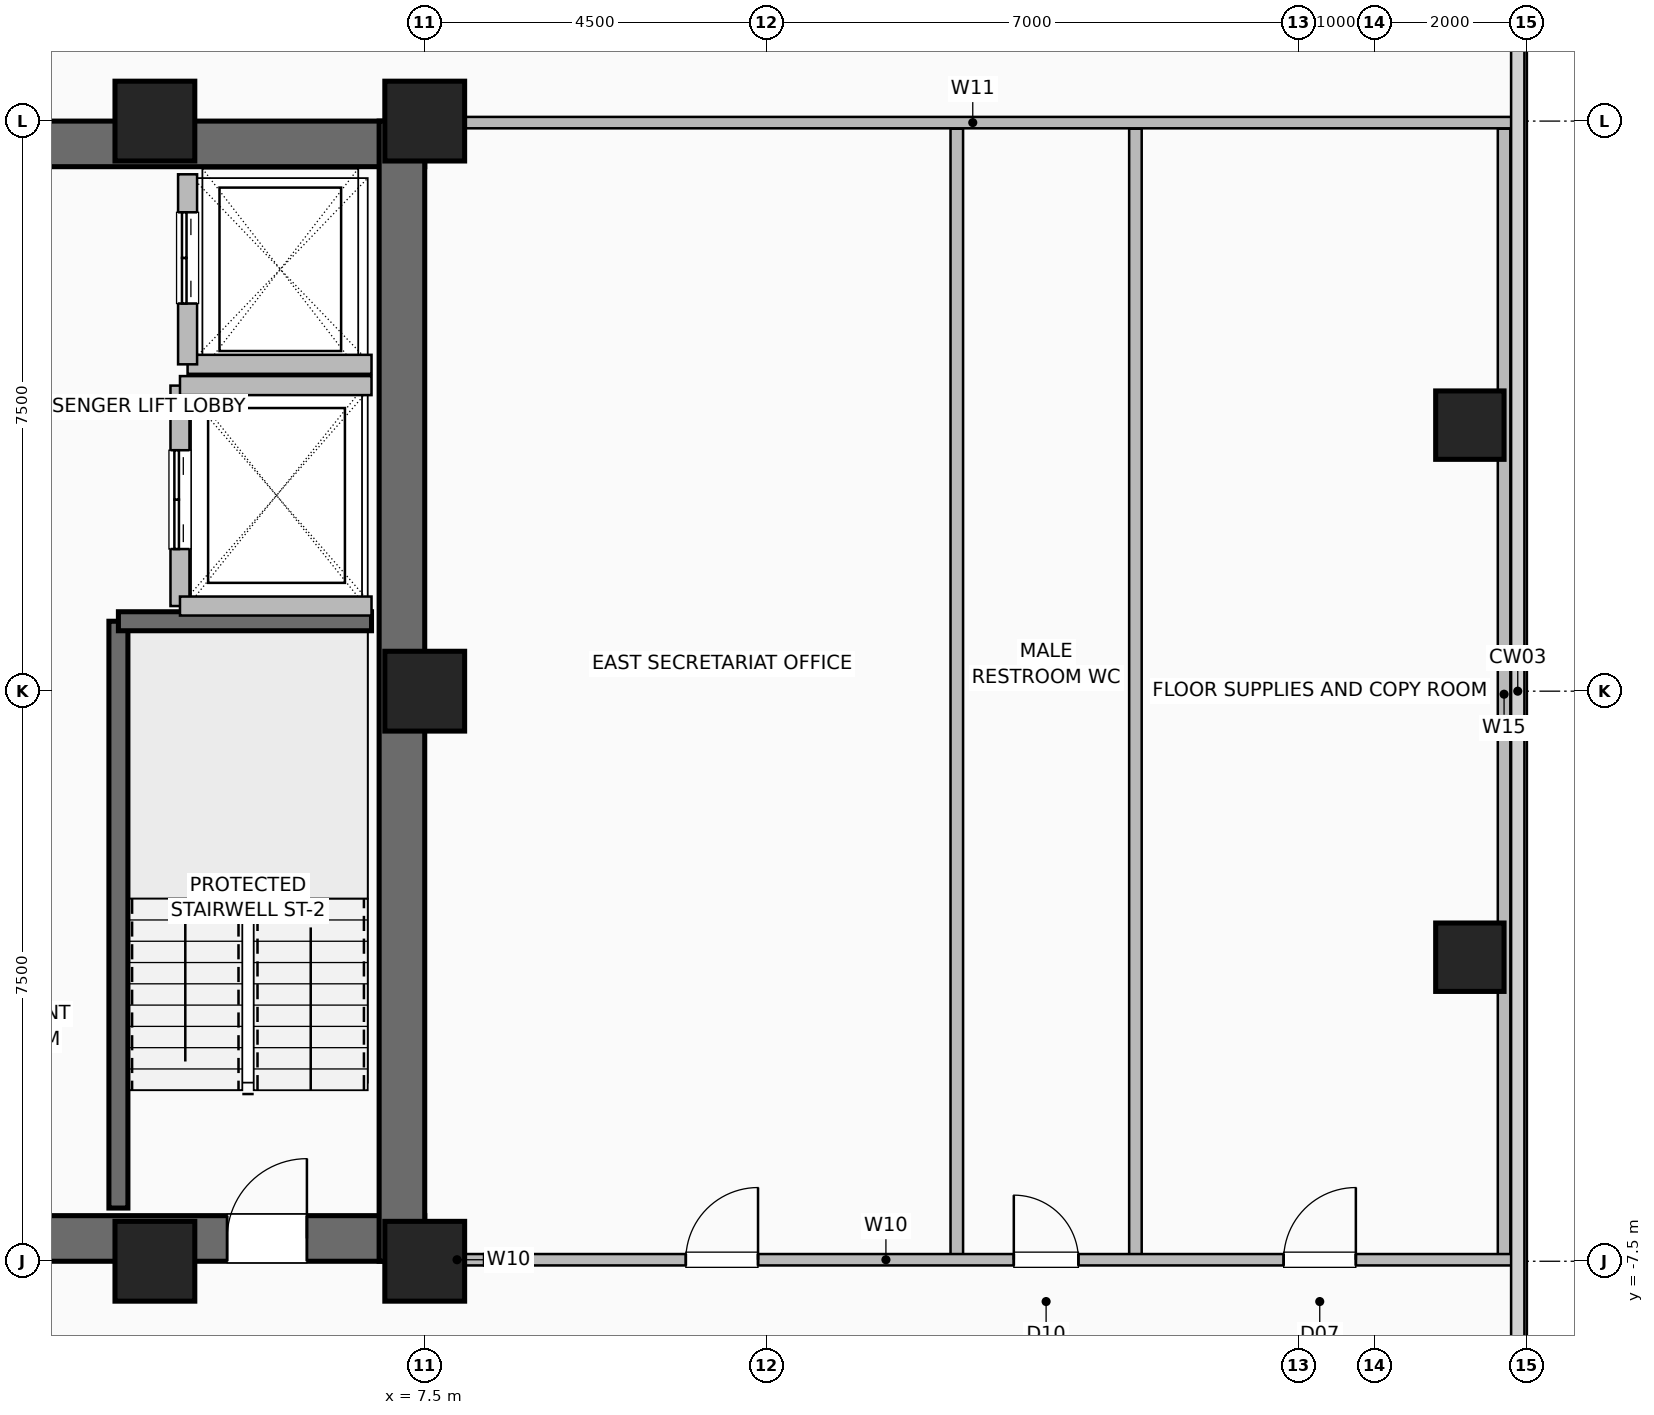
"""IFC4 building model, lengths in metres.
Left out: names, types, materials, properties, quantities, classifications, styles, units other than length and angle.
Written with IfcOpenShell. Run it as: python <this file> out.ifc"""

import sys

from ifc_helpers import new_model, si_unit, direction, frame, frame_2d, origin, origin_2d, place, context, subcontext, project, spatial, rectangle, hollow_rectangle, extrude, element, fill, save


model = new_model("IFC4")
c1 = context("Model", 3, precision=1e-05, world=origin(), true_north=direction((0.0, 1.0)))
c2 = subcontext(c1, "Body", "Model", "MODEL_VIEW")
j1 = project(units=[si_unit("LENGTHUNIT", "METRE"), si_unit("PLANEANGLEUNIT", "RADIAN")], contexts=[c1])
p1 = place(None, origin())
s1 = spatial("IfcSite", under=j1, at=p1, CompositionType="ELEMENT")
p2 = place(p1, origin())
s2 = spatial("IfcBuilding", under=s1, at=p2, CompositionType="ELEMENT")
p3 = place(p2, frame((0.0, 0.0, 112.0)))
s3 = spatial("IfcBuildingStorey", under=s2, at=p3, CompositionType="ELEMENT", Elevation=112.0)
for number, where, z_axis, x_axis in (
    (1, (3.95, -7.5, 0.0), (0.0, 0.0, 1.0), (1.0, 0.0, 0.0)),
    (2, (7.5, -7.5, 0.0), (0.0, 0.0, 1.0), (1.0, 0.0, 0.0)),
    (3, (7.5, 0.0, 0.0), (0.0, 0.0, 1.0), (1.0, 0.0, 0.0)),
    (4, (7.5, 7.5, 0.0), (0.0, 0.0, 1.0), (1.0, 0.0, 0.0)),
    (5, (3.95, 7.5, 0.0), (0.0, 0.0, 1.0), (1.0, 0.0, 0.0)),
):
    element("IfcColumn", number, at=place(p3, frame(where, z_axis=z_axis, x_axis=x_axis)), inside=s3, PredefinedType="COLUMN", context=c2, shape_type="SweptSolid", body=[
        extrude(hollow_rectangle(XDim=1.05, YDim=1.05, WallThickness=0.05, at=origin_2d()), origin(), (0.0, 0.0, 1.0), 3.6),
    ])
for number, where, z_axis, x_axis in (
    (6, (21.25, -3.5, 0.0), (0.0, 0.0, 1.0), (1.0, 0.0, 0.0)),
    (7, (21.25, 3.5, 0.0), (0.0, 0.0, 1.0), (1.0, 0.0, 0.0)),
):
    element("IfcColumn", number, at=place(p3, frame(where, z_axis=z_axis, x_axis=x_axis)), inside=s3, PredefinedType="COLUMN", context=c2, shape_type="SweptSolid", body=[
        extrude(hollow_rectangle(XDim=0.9, YDim=0.9, WallThickness=0.045, at=origin_2d()), origin(), (0.0, 0.0, 1.0), 3.6),
    ])
p4 = place(p3, frame((-7.5, -7.2, 0.0), z_axis=(0.0, 0.0, 1.0), x_axis=(1.0, 0.0, 0.0)))
e8 = element("IfcWall", 8, at=p4, inside=s3, PredefinedType="SHEAR", context=c2, shape_type="SweptSolid", body=[
    extrude(rectangle(XDim=15.0, YDim=0.6, at=frame_2d((7.5, 0.0))), origin(), (0.0, 0.0, 1.0), 3.36),
])
p5 = place(p4, frame((1.55, 0.0, 0.0)))
e9 = element("IfcOpeningElement", 9, at=p5, cuts=e8, PredefinedType="OPENING", context=c2, shape_type="SweptSolid", body=[
    extrude(rectangle(XDim=1.05, YDim=2.08, at=frame_2d((0.525, 1.04))), frame((0.0, 0.31, 0.0), z_axis=(0.0, -1.0, 0.0), x_axis=(1.0, 0.0, 0.0)), (0.0, 0.0, 1.0), 0.62),
])
p6 = place(p4, frame((12.4, 0.0, 0.0)))
e10 = element("IfcOpeningElement", 10, at=p6, cuts=e8, PredefinedType="OPENING", context=c2, shape_type="SweptSolid", body=[
    extrude(rectangle(XDim=1.05, YDim=2.08, at=frame_2d((0.525, 1.04))), frame((0.0, 0.31, 0.0), z_axis=(0.0, -1.0, 0.0), x_axis=(1.0, 0.0, 0.0)), (0.0, 0.0, 1.0), 0.62),
])
p7 = place(p4, frame((5.2, 0.0, 0.0)))
e11 = element("IfcOpeningElement", 11, at=p7, cuts=e8, PredefinedType="OPENING", context=c2, shape_type="SweptSolid", body=[
    extrude(rectangle(XDim=1.0, YDim=2.08, at=frame_2d((0.5, 1.04))), frame((0.0, 0.31, 0.0), z_axis=(0.0, -1.0, 0.0), x_axis=(1.0, 0.0, 0.0)), (0.0, 0.0, 1.0), 0.62),
])
p8 = place(p4, frame((8.65, 0.0, 0.0)))
e12 = element("IfcOpeningElement", 12, at=p8, cuts=e8, PredefinedType="OPENING", context=c2, shape_type="SweptSolid", body=[
    extrude(rectangle(XDim=1.0, YDim=2.08, at=frame_2d((0.5, 1.04))), frame((0.0, 0.31, 0.0), z_axis=(0.0, -1.0, 0.0), x_axis=(1.0, 0.0, 0.0)), (0.0, 0.0, 1.0), 0.62),
])
for number, where, z_axis, x_axis in (
    (13, (-7.5, 7.2, 0.0), (0.0, 0.0, 1.0), (1.0, 0.0, 0.0)),
    (14, (7.2, -7.5, 0.0), (0.0, 0.0, 1.0), (0.0, 1.0, 0.0)),
):
    element("IfcWall", number, at=place(p3, frame(where, z_axis=z_axis, x_axis=x_axis)), inside=s3, PredefinedType="SHEAR", context=c2, shape_type="SweptSolid", body=[
        extrude(rectangle(XDim=15.0, YDim=0.6, at=frame_2d((7.5, 0.0))), origin(), (0.0, 0.0, 1.0), 3.36),
    ])
p9 = place(p3, frame((3.47, -6.8, 0.0), z_axis=(0.0, 0.0, 1.0), x_axis=(0.0, 1.0, 0.0)))
e15 = element("IfcWall", 15, at=p9, inside=s3, PredefinedType="SHEAR", context=c2, shape_type="SweptSolid", body=[
    extrude(rectangle(XDim=7.72, YDim=0.25, at=frame_2d((3.86, 0.0))), origin(), (0.0, 0.0, 1.0), 3.36),
])
p10 = place(p3, frame((3.47, 0.92, 0.0), z_axis=(0.0, 0.0, 1.0), x_axis=(1.0, 0.0, 0.0)))
e16 = element("IfcWall", 16, at=p10, inside=s3, PredefinedType="SHEAR", context=c2, shape_type="SweptSolid", body=[
    extrude(rectangle(XDim=3.33, YDim=0.25, at=frame_2d((1.665, 0.0))), origin(), (0.0, 0.0, 1.0), 3.36),
])
p11 = place(p3, frame((4.38, 4.3, 0.0), z_axis=(0.0, 0.0, 1.0), x_axis=(1.0, 0.0, 0.0)))
e17 = element("IfcWall", 17, at=p11, inside=s3, PredefinedType="SHEAR", context=c2, shape_type="SweptSolid", body=[
    extrude(rectangle(XDim=2.42, YDim=0.25, at=frame_2d((1.21, 0.0))), origin(), (0.0, 0.0, 1.0), 3.36),
])
p12 = place(p3, frame((4.38, 4.3, 0.0), z_axis=(0.0, 0.0, 1.0), x_axis=(0.0, 1.0, 0.0)))
e18 = element("IfcWall", 18, at=p12, inside=s3, PredefinedType="SHEAR", context=c2, shape_type="SweptSolid", body=[
    extrude(rectangle(XDim=2.5, YDim=0.25, at=frame_2d((1.25, 0.0))), origin(), (0.0, 0.0, 1.0), 3.36),
])
p13 = place(p12, frame((0.8, 0.0, 0.0)))
e19 = element("IfcOpeningElement", 19, at=p13, cuts=e18, PredefinedType="OPENING", context=c2, shape_type="SweptSolid", body=[
    extrude(rectangle(XDim=1.2, YDim=2.2, at=frame_2d((0.6, 1.1))), frame((0.0, 0.135, 0.0), z_axis=(0.0, -1.0, 0.0), x_axis=(1.0, 0.0, 0.0)), (0.0, 0.0, 1.0), 0.27),
])
p14 = place(p3, frame((4.28, 1.12, 0.0), z_axis=(0.0, 0.0, 1.0), x_axis=(0.0, 1.0, 0.0)))
e20 = element("IfcWall", 20, at=p14, inside=s3, PredefinedType="SHEAR", context=c2, shape_type="SweptSolid", body=[
    extrude(rectangle(XDim=2.9, YDim=0.25, at=frame_2d((1.45, 0.0))), origin(), (0.0, 0.0, 1.0), 3.36),
])
p15 = place(p14, frame((0.75, 0.0, 0.0)))
e21 = element("IfcOpeningElement", 21, at=p15, cuts=e20, PredefinedType="OPENING", context=c2, shape_type="SweptSolid", body=[
    extrude(rectangle(XDim=1.3, YDim=2.3, at=frame_2d((0.65, 1.15))), frame((0.0, 0.135, 0.0), z_axis=(0.0, -1.0, 0.0), x_axis=(1.0, 0.0, 0.0)), (0.0, 0.0, 1.0), 0.27),
])
for number, where, z_axis, x_axis in (
    (22, (4.28, 1.12, 0.0), (0.0, 0.0, 1.0), (1.0, 0.0, 0.0)),
    (23, (4.28, 4.02, 0.0), (0.0, 0.0, 1.0), (1.0, 0.0, 0.0)),
):
    element("IfcWall", number, at=place(p3, frame(where, z_axis=z_axis, x_axis=x_axis)), inside=s3, PredefinedType="SHEAR", context=c2, shape_type="SweptSolid", body=[
        extrude(rectangle(XDim=2.52, YDim=0.25, at=frame_2d((1.26, 0.0))), origin(), (0.0, 0.0, 1.0), 3.36),
    ])
p16 = place(p3, frame((7.45, -7.48, 0.0), z_axis=(0.0, 0.0, 1.0), x_axis=(1.0, 0.0, 0.0)))
e24 = element("IfcWall", 24, at=p16, inside=s3, PredefinedType="PARTITIONING", context=c2, shape_type="SweptSolid", body=[
    extrude(rectangle(XDim=0.95, YDim=0.15, at=frame_2d((0.475, 0.0))), origin(), (0.0, 0.0, 1.0), 3.36),
])
for number, where, z_axis, x_axis in (
    (25, (16.85, -7.48, 0.0), (0.0, 0.0, 1.0), (0.0, 1.0, 0.0)),
    (26, (14.5, -7.48, 0.0), (0.0, 0.0, 1.0), (0.0, 1.0, 0.0)),
    (27, (21.7, -7.48, 0.0), (0.0, 0.0, 1.0), (0.0, 1.0, 0.0)),
):
    element("IfcWall", number, at=place(p3, frame(where, z_axis=z_axis, x_axis=x_axis)), inside=s3, PredefinedType="PLUMBINGWALL", context=c2, shape_type="SweptSolid", body=[
        extrude(rectangle(XDim=14.88, YDim=0.165, at=frame_2d((7.44, 0.0))), origin(), (0.0, 0.0, 1.0), 3.36),
    ])
p17 = place(p3, frame((8.28, -7.48, 0.0), z_axis=(0.0, 0.0, 1.0), x_axis=(1.0, 0.0, 0.0)))
e28 = element("IfcWall", 28, at=p17, inside=s3, PredefinedType="PARTITIONING", context=c2, shape_type="SweptSolid", body=[
    extrude(rectangle(XDim=13.54, YDim=0.15, at=frame_2d((6.77, 0.0))), origin(), (0.0, 0.0, 1.0), 3.36),
])
p18 = place(p17, frame((2.655, 0.0, 0.0)))
e29 = element("IfcOpeningElement", 29, at=p18, cuts=e28, PredefinedType="OPENING", context=c2, shape_type="SweptSolid", body=[
    extrude(rectangle(XDim=0.95, YDim=2.06, at=frame_2d((0.475, 1.03))), frame((0.0, 0.085, 0.0), z_axis=(0.0, -1.0, 0.0), x_axis=(1.0, 0.0, 0.0)), (0.0, 0.0, 1.0), 0.17),
])
p19 = place(p17, frame((6.97, 0.0, 0.0)))
e30 = element("IfcOpeningElement", 30, at=p19, cuts=e28, PredefinedType="OPENING", context=c2, shape_type="SweptSolid", body=[
    extrude(rectangle(XDim=0.85, YDim=2.05, at=frame_2d((0.425, 1.025))), frame((0.0, 0.085, 0.0), z_axis=(0.0, -1.0, 0.0), x_axis=(1.0, 0.0, 0.0)), (0.0, 0.0, 1.0), 0.17),
])
p20 = place(p17, frame((10.52, 0.0, 0.0)))
e31 = element("IfcOpeningElement", 31, at=p20, cuts=e28, PredefinedType="OPENING", context=c2, shape_type="SweptSolid", body=[
    extrude(rectangle(XDim=0.95, YDim=2.06, at=frame_2d((0.475, 1.03))), frame((0.0, 0.085, 0.0), z_axis=(0.0, -1.0, 0.0), x_axis=(1.0, 0.0, 0.0)), (0.0, 0.0, 1.0), 0.17),
])
p21 = place(p3, frame((7.6, 7.48, 0.0), z_axis=(0.0, 0.0, 1.0), x_axis=(1.0, 0.0, 0.0)))
e32 = element("IfcWall", 32, at=p21, inside=s3, PredefinedType="PARTITIONING", context=c2, shape_type="SweptSolid", body=[
    extrude(rectangle(XDim=14.22, YDim=0.15, at=frame_2d((7.11, 0.0))), origin(), (0.0, 0.0, 1.0), 3.36),
])
p22 = place(p6, origin())
e33 = element("IfcDoor", 33, at=p22, inside=s3, OperationType="SINGLE_SWING_RIGHT", PredefinedType="DOOR", context=c2, shape_type="SweptSolid", body=[
    extrude(rectangle(XDim=1.05, YDim=2.08, at=frame_2d((0.525, 1.04))), frame((0.0, 0.025, 0.0), z_axis=(0.0, -1.0, 0.0), x_axis=(1.0, 0.0, 0.0)), (0.0, 0.0, 1.0), 0.05),
])
fill(e10, e33)
p23 = place(p13, origin())
e34 = element("IfcDoor", 34, at=p23, inside=s3, OperationType="DOUBLE_DOOR_SLIDING", PredefinedType="DOOR", context=c2, shape_type="SweptSolid", body=[
    extrude(rectangle(XDim=1.2, YDim=2.2, at=frame_2d((0.6, 1.1))), frame((0.0, 0.025, 0.0), z_axis=(0.0, -1.0, 0.0), x_axis=(1.0, 0.0, 0.0)), (0.0, 0.0, 1.0), 0.05),
])
fill(e19, e34)
p24 = place(p15, origin())
e35 = element("IfcDoor", 35, at=p24, inside=s3, OperationType="DOUBLE_DOOR_SLIDING", PredefinedType="DOOR", context=c2, shape_type="SweptSolid", body=[
    extrude(rectangle(XDim=1.3, YDim=2.3, at=frame_2d((0.65, 1.15))), frame((0.0, 0.025, 0.0), z_axis=(0.0, -1.0, 0.0), x_axis=(1.0, 0.0, 0.0)), (0.0, 0.0, 1.0), 0.05),
])
fill(e21, e35)
p25 = place(p18, origin())
e36 = element("IfcDoor", 36, at=p25, inside=s3, OperationType="SINGLE_SWING_RIGHT", PredefinedType="DOOR", context=c2, shape_type="SweptSolid", body=[
    extrude(rectangle(XDim=0.95, YDim=2.06, at=frame_2d((0.475, 1.03))), frame((0.0, 0.025, 0.0), z_axis=(0.0, -1.0, 0.0), x_axis=(1.0, 0.0, 0.0)), (0.0, 0.0, 1.0), 0.05),
])
fill(e29, e36)
p26 = place(p19, origin())
e37 = element("IfcDoor", 37, at=p26, inside=s3, OperationType="SINGLE_SWING_LEFT", PredefinedType="DOOR", context=c2, shape_type="SweptSolid", body=[
    extrude(rectangle(XDim=0.85, YDim=2.05, at=frame_2d((0.425, 1.025))), frame((0.0, 0.025, 0.0), z_axis=(0.0, -1.0, 0.0), x_axis=(1.0, 0.0, 0.0)), (0.0, 0.0, 1.0), 0.05),
])
fill(e30, e37)
p27 = place(p20, origin())
e38 = element("IfcDoor", 38, at=p27, inside=s3, OperationType="SINGLE_SWING_RIGHT", PredefinedType="DOOR", context=c2, shape_type="SweptSolid", body=[
    extrude(rectangle(XDim=0.95, YDim=2.06, at=frame_2d((0.475, 1.03))), frame((0.0, 0.025, 0.0), z_axis=(0.0, -1.0, 0.0), x_axis=(1.0, 0.0, 0.0)), (0.0, 0.0, 1.0), 0.05),
])
fill(e31, e38)
save(model, sys.argv[1])
